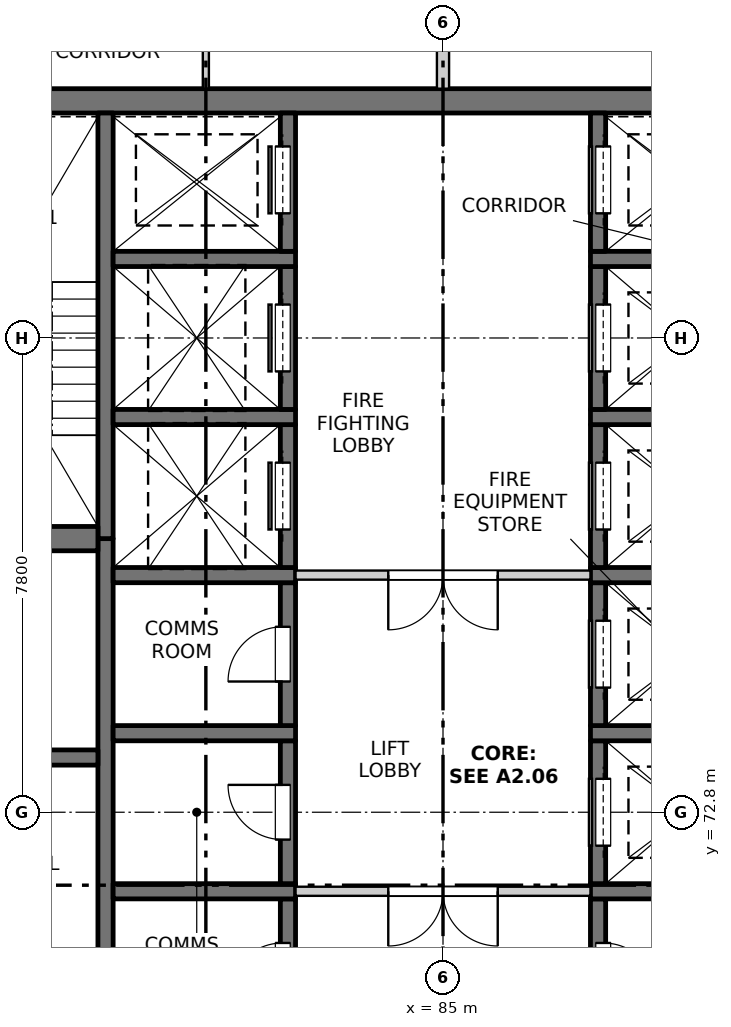
"""IFC4 building model, lengths in metres.
Left out: names, types, materials, properties, quantities, classifications, styles, units other than length and angle.
Written with IfcOpenShell. Run it as: python <this file> out.ifc"""

import sys

from ifc_helpers import new_model, si_unit, direction, frame, frame_2d, origin, place, context, subcontext, project, spatial, rectangle, extrude, element, fill, save


model = new_model("IFC4")
c1 = context("Model", 3, precision=1e-05, world=origin(), true_north=direction((0.0, 1.0)))
c2 = subcontext(c1, "Body", "Model", "MODEL_VIEW")
j1 = project(units=[si_unit("LENGTHUNIT", "METRE"), si_unit("PLANEANGLEUNIT", "RADIAN")], contexts=[c1])
p1 = place(None, origin())
s1 = spatial("IfcSite", under=j1, at=p1, CompositionType="ELEMENT")
p2 = place(p1, origin())
s2 = spatial("IfcBuilding", under=s1, at=p2, CompositionType="ELEMENT")
p3 = place(p2, frame((0.0, 0.0, 238.1)))
s3 = spatial("IfcBuildingStorey", under=s2, at=p3, CompositionType="ELEMENT", Elevation=238.1)
p4 = place(p3, frame((75.45, 84.5, -0.25), z_axis=(0.0, 0.0, 1.0), x_axis=(1.0, 0.0, 0.0)))
e1 = element("IfcWall", 1, at=p4, inside=s3, PredefinedType="SOLIDWALL", context=c2, shape_type="SweptSolid", body=[
    extrude(rectangle(XDim=19.1, YDim=0.4, at=frame_2d((9.55, 0.0))), origin(), (0.0, 0.0, 1.0), 3.35),
])
p5 = place(p3, frame((79.45, 60.975, -0.25), z_axis=(0.0, 0.0, 1.0), x_axis=(0.0, 1.0, 0.0)))
e2 = element("IfcWall", 2, at=p5, inside=s3, PredefinedType="SOLIDWALL", context=c2, shape_type="SweptSolid", body=[
    extrude(rectangle(XDim=16.325, YDim=0.25, at=frame_2d((8.163, 0.0))), origin(), (0.0, 0.0, 1.0), 3.35),
])
p6 = place(p3, frame((79.45, 77.3, -0.25), z_axis=(0.0, 0.0, 1.0), x_axis=(0.0, 1.0, 0.0)))
e3 = element("IfcWall", 3, at=p6, inside=s3, PredefinedType="SOLIDWALL", context=c2, shape_type="SweptSolid", body=[
    extrude(rectangle(XDim=7.0, YDim=0.25, at=frame_2d((3.5, 0.0))), origin(), (0.0, 0.0, 1.0), 3.35),
])
p7 = place(p3, frame((82.45, 69.025, -0.25), z_axis=(0.0, 0.0, 1.0), x_axis=(0.0, 1.0, 0.0)))
e4 = element("IfcWall", 4, at=p7, inside=s3, PredefinedType="SOLIDWALL", context=c2, shape_type="SweptSolid", body=[
    extrude(rectangle(XDim=2.35, YDim=0.25, at=frame_2d((1.175, 0.0))), origin(), (0.0, 0.0, 1.0), 3.35),
])
p8 = place(p7, frame((0.725, 0.0, 0.25)))
e5 = element("IfcOpeningElement", 5, at=p8, cuts=e4, PredefinedType="OPENING", context=c2, shape_type="SweptSolid", body=[
    extrude(rectangle(XDim=0.9, YDim=2.1, at=frame_2d((0.45, 1.05))), frame((0.0, 0.135, 0.0), z_axis=(0.0, -1.0, 0.0), x_axis=(1.0, 0.0, 0.0)), (0.0, 0.0, 1.0), 0.27),
])
p9 = place(p3, frame((79.575, 71.5, -0.25), z_axis=(0.0, 0.0, 1.0), x_axis=(1.0, 0.0, 0.0)))
e6 = element("IfcWall", 6, at=p9, inside=s3, PredefinedType="SOLIDWALL", context=c2, shape_type="SweptSolid", body=[
    extrude(rectangle(XDim=3.0, YDim=0.25, at=frame_2d((1.5, 0.0))), origin(), (0.0, 0.0, 1.0), 3.35),
])
p10 = place(p3, frame((82.45, 71.625, -0.25), z_axis=(0.0, 0.0, 1.0), x_axis=(0.0, 1.0, 0.0)))
e7 = element("IfcWall", 7, at=p10, inside=s3, PredefinedType="SOLIDWALL", context=c2, shape_type="SweptSolid", body=[
    extrude(rectangle(XDim=2.35, YDim=0.25, at=frame_2d((1.175, 0.0))), origin(), (0.0, 0.0, 1.0), 3.35),
])
p11 = place(p10, frame((0.725, 0.0, 0.25)))
e8 = element("IfcOpeningElement", 8, at=p11, cuts=e7, PredefinedType="OPENING", context=c2, shape_type="SweptSolid", body=[
    extrude(rectangle(XDim=0.9, YDim=2.1, at=frame_2d((0.45, 1.05))), frame((0.0, 0.135, 0.0), z_axis=(0.0, -1.0, 0.0), x_axis=(1.0, 0.0, 0.0)), (0.0, 0.0, 1.0), 0.27),
])
p12 = place(p3, frame((79.575, 74.1, -0.25), z_axis=(0.0, 0.0, 1.0), x_axis=(1.0, 0.0, 0.0)))
e9 = element("IfcWall", 9, at=p12, inside=s3, PredefinedType="SOLIDWALL", context=c2, shape_type="SweptSolid", body=[
    extrude(rectangle(XDim=3.0, YDim=0.25, at=frame_2d((1.5, 0.0))), origin(), (0.0, 0.0, 1.0), 3.35),
])
p13 = place(p3, frame((82.45, 74.225, -0.25), z_axis=(0.0, 0.0, 1.0), x_axis=(0.0, 1.0, 0.0)))
e10 = element("IfcWall", 10, at=p13, inside=s3, PredefinedType="SOLIDWALL", context=c2, shape_type="SweptSolid", body=[
    extrude(rectangle(XDim=2.35, YDim=0.25, at=frame_2d((1.175, 0.0))), origin(), (0.0, 0.0, 1.0), 3.35),
])
p14 = place(p13, frame((0.725, 0.0, 0.25)))
e11 = element("IfcOpeningElement", 11, at=p14, cuts=e10, PredefinedType="OPENING", context=c2, shape_type="SweptSolid", body=[
    extrude(rectangle(XDim=0.9, YDim=2.1, at=frame_2d((0.45, 1.05))), frame((0.0, 0.135, 0.0), z_axis=(0.0, -1.0, 0.0), x_axis=(1.0, 0.0, 0.0)), (0.0, 0.0, 1.0), 0.27),
])
p15 = place(p3, frame((79.575, 76.7, -0.25), z_axis=(0.0, 0.0, 1.0), x_axis=(1.0, 0.0, 0.0)))
e12 = element("IfcWall", 12, at=p15, inside=s3, PredefinedType="SOLIDWALL", context=c2, shape_type="SweptSolid", body=[
    extrude(rectangle(XDim=3.0, YDim=0.25, at=frame_2d((1.5, 0.0))), origin(), (0.0, 0.0, 1.0), 3.35),
])
p16 = place(p3, frame((82.45, 76.825, -0.25), z_axis=(0.0, 0.0, 1.0), x_axis=(0.0, 1.0, 0.0)))
e13 = element("IfcWall", 13, at=p16, inside=s3, PredefinedType="SOLIDWALL", context=c2, shape_type="SweptSolid", body=[
    extrude(rectangle(XDim=2.35, YDim=0.25, at=frame_2d((1.175, 0.0))), origin(), (0.0, 0.0, 1.0), 3.35),
])
p17 = place(p16, frame((0.625, 0.0, 0.25)))
e14 = element("IfcOpeningElement", 14, at=p17, cuts=e13, PredefinedType="OPENING", context=c2, shape_type="SweptSolid", body=[
    extrude(rectangle(XDim=1.1, YDim=2.1, at=frame_2d((0.55, 1.05))), frame((0.0, 0.135, 0.0), z_axis=(0.0, -1.0, 0.0), x_axis=(1.0, 0.0, 0.0)), (0.0, 0.0, 1.0), 0.27),
])
p18 = place(p3, frame((79.575, 79.3, -0.25), z_axis=(0.0, 0.0, 1.0), x_axis=(1.0, 0.0, 0.0)))
e15 = element("IfcWall", 15, at=p18, inside=s3, PredefinedType="SOLIDWALL", context=c2, shape_type="SweptSolid", body=[
    extrude(rectangle(XDim=3.0, YDim=0.25, at=frame_2d((1.5, 0.0))), origin(), (0.0, 0.0, 1.0), 3.35),
])
p19 = place(p3, frame((82.45, 79.425, -0.25), z_axis=(0.0, 0.0, 1.0), x_axis=(0.0, 1.0, 0.0)))
e16 = element("IfcWall", 16, at=p19, inside=s3, PredefinedType="SOLIDWALL", context=c2, shape_type="SweptSolid", body=[
    extrude(rectangle(XDim=2.35, YDim=0.25, at=frame_2d((1.175, 0.0))), origin(), (0.0, 0.0, 1.0), 3.35),
])
p20 = place(p19, frame((0.625, 0.0, 0.25)))
e17 = element("IfcOpeningElement", 17, at=p20, cuts=e16, PredefinedType="OPENING", context=c2, shape_type="SweptSolid", body=[
    extrude(rectangle(XDim=1.1, YDim=2.1, at=frame_2d((0.55, 1.05))), frame((0.0, 0.135, 0.0), z_axis=(0.0, -1.0, 0.0), x_axis=(1.0, 0.0, 0.0)), (0.0, 0.0, 1.0), 0.27),
])
p21 = place(p3, frame((79.575, 81.9, -0.25), z_axis=(0.0, 0.0, 1.0), x_axis=(1.0, 0.0, 0.0)))
e18 = element("IfcWall", 18, at=p21, inside=s3, PredefinedType="SOLIDWALL", context=c2, shape_type="SweptSolid", body=[
    extrude(rectangle(XDim=3.0, YDim=0.25, at=frame_2d((1.5, 0.0))), origin(), (0.0, 0.0, 1.0), 3.35),
])
p22 = place(p3, frame((82.45, 82.025, -0.25), z_axis=(0.0, 0.0, 1.0), x_axis=(0.0, 1.0, 0.0)))
e19 = element("IfcWall", 19, at=p22, inside=s3, PredefinedType="SOLIDWALL", context=c2, shape_type="SweptSolid", body=[
    extrude(rectangle(XDim=2.275, YDim=0.25, at=frame_2d((1.138, 0.0))), origin(), (0.0, 0.0, 1.0), 3.35),
])
p23 = place(p22, frame((0.625, 0.0, 0.25)))
e20 = element("IfcOpeningElement", 20, at=p23, cuts=e19, PredefinedType="OPENING", context=c2, shape_type="SweptSolid", body=[
    extrude(rectangle(XDim=1.1, YDim=2.1, at=frame_2d((0.55, 1.05))), frame((0.0, 0.135, 0.0), z_axis=(0.0, -1.0, 0.0), x_axis=(1.0, 0.0, 0.0)), (0.0, 0.0, 1.0), 0.27),
])
p24 = place(p3, frame((87.55, 69.025, -0.25), z_axis=(0.0, 0.0, 1.0), x_axis=(0.0, 1.0, 0.0)))
e21 = element("IfcWall", 21, at=p24, inside=s3, PredefinedType="SOLIDWALL", context=c2, shape_type="SweptSolid", body=[
    extrude(rectangle(XDim=2.35, YDim=0.25, at=frame_2d((1.175, 0.0))), origin(), (0.0, 0.0, 1.0), 3.35),
])
p25 = place(p24, frame((0.725, 0.0, 0.25)))
e22 = element("IfcOpeningElement", 22, at=p25, cuts=e21, PredefinedType="OPENING", context=c2, shape_type="SweptSolid", body=[
    extrude(rectangle(XDim=0.9, YDim=2.1, at=frame_2d((0.45, 1.05))), frame((0.0, 0.135, 0.0), z_axis=(0.0, -1.0, 0.0), x_axis=(1.0, 0.0, 0.0)), (0.0, 0.0, 1.0), 0.27),
])
p26 = place(p3, frame((87.425, 71.5, -0.25), z_axis=(0.0, 0.0, 1.0), x_axis=(1.0, 0.0, 0.0)))
e23 = element("IfcWall", 23, at=p26, inside=s3, PredefinedType="SOLIDWALL", context=c2, shape_type="SweptSolid", body=[
    extrude(rectangle(XDim=3.0, YDim=0.25, at=frame_2d((1.5, 0.0))), origin(), (0.0, 0.0, 1.0), 3.35),
])
p27 = place(p3, frame((87.55, 71.625, -0.25), z_axis=(0.0, 0.0, 1.0), x_axis=(0.0, 1.0, 0.0)))
e24 = element("IfcWall", 24, at=p27, inside=s3, PredefinedType="SOLIDWALL", context=c2, shape_type="SweptSolid", body=[
    extrude(rectangle(XDim=2.35, YDim=0.25, at=frame_2d((1.175, 0.0))), origin(), (0.0, 0.0, 1.0), 3.35),
])
p28 = place(p27, frame((0.625, 0.0, 0.25)))
e25 = element("IfcOpeningElement", 25, at=p28, cuts=e24, PredefinedType="OPENING", context=c2, shape_type="SweptSolid", body=[
    extrude(rectangle(XDim=1.1, YDim=2.1, at=frame_2d((0.55, 1.05))), frame((0.0, 0.135, 0.0), z_axis=(0.0, -1.0, 0.0), x_axis=(1.0, 0.0, 0.0)), (0.0, 0.0, 1.0), 0.27),
])
p29 = place(p3, frame((87.425, 74.1, -0.25), z_axis=(0.0, 0.0, 1.0), x_axis=(1.0, 0.0, 0.0)))
e26 = element("IfcWall", 26, at=p29, inside=s3, PredefinedType="SOLIDWALL", context=c2, shape_type="SweptSolid", body=[
    extrude(rectangle(XDim=3.0, YDim=0.25, at=frame_2d((1.5, 0.0))), origin(), (0.0, 0.0, 1.0), 3.35),
])
p30 = place(p3, frame((87.55, 74.225, -0.25), z_axis=(0.0, 0.0, 1.0), x_axis=(0.0, 1.0, 0.0)))
e27 = element("IfcWall", 27, at=p30, inside=s3, PredefinedType="SOLIDWALL", context=c2, shape_type="SweptSolid", body=[
    extrude(rectangle(XDim=2.35, YDim=0.25, at=frame_2d((1.175, 0.0))), origin(), (0.0, 0.0, 1.0), 3.35),
])
p31 = place(p30, frame((0.625, 0.0, 0.25)))
e28 = element("IfcOpeningElement", 28, at=p31, cuts=e27, PredefinedType="OPENING", context=c2, shape_type="SweptSolid", body=[
    extrude(rectangle(XDim=1.1, YDim=2.1, at=frame_2d((0.55, 1.05))), frame((0.0, 0.135, 0.0), z_axis=(0.0, -1.0, 0.0), x_axis=(1.0, 0.0, 0.0)), (0.0, 0.0, 1.0), 0.27),
])
p32 = place(p3, frame((87.425, 76.7, -0.25), z_axis=(0.0, 0.0, 1.0), x_axis=(1.0, 0.0, 0.0)))
e29 = element("IfcWall", 29, at=p32, inside=s3, PredefinedType="SOLIDWALL", context=c2, shape_type="SweptSolid", body=[
    extrude(rectangle(XDim=3.0, YDim=0.25, at=frame_2d((1.5, 0.0))), origin(), (0.0, 0.0, 1.0), 3.35),
])
p33 = place(p3, frame((87.55, 76.825, -0.25), z_axis=(0.0, 0.0, 1.0), x_axis=(0.0, 1.0, 0.0)))
e30 = element("IfcWall", 30, at=p33, inside=s3, PredefinedType="SOLIDWALL", context=c2, shape_type="SweptSolid", body=[
    extrude(rectangle(XDim=2.35, YDim=0.25, at=frame_2d((1.175, 0.0))), origin(), (0.0, 0.0, 1.0), 3.35),
])
p34 = place(p33, frame((0.625, 0.0, 0.25)))
e31 = element("IfcOpeningElement", 31, at=p34, cuts=e30, PredefinedType="OPENING", context=c2, shape_type="SweptSolid", body=[
    extrude(rectangle(XDim=1.1, YDim=2.1, at=frame_2d((0.55, 1.05))), frame((0.0, 0.135, 0.0), z_axis=(0.0, -1.0, 0.0), x_axis=(1.0, 0.0, 0.0)), (0.0, 0.0, 1.0), 0.27),
])
p35 = place(p3, frame((87.425, 79.3, -0.25), z_axis=(0.0, 0.0, 1.0), x_axis=(1.0, 0.0, 0.0)))
e32 = element("IfcWall", 32, at=p35, inside=s3, PredefinedType="SOLIDWALL", context=c2, shape_type="SweptSolid", body=[
    extrude(rectangle(XDim=3.0, YDim=0.25, at=frame_2d((1.5, 0.0))), origin(), (0.0, 0.0, 1.0), 3.35),
])
p36 = place(p3, frame((87.55, 79.425, -0.25), z_axis=(0.0, 0.0, 1.0), x_axis=(0.0, 1.0, 0.0)))
e33 = element("IfcWall", 33, at=p36, inside=s3, PredefinedType="SOLIDWALL", context=c2, shape_type="SweptSolid", body=[
    extrude(rectangle(XDim=2.35, YDim=0.25, at=frame_2d((1.175, 0.0))), origin(), (0.0, 0.0, 1.0), 3.35),
])
p37 = place(p36, frame((0.625, 0.0, 0.25)))
e34 = element("IfcOpeningElement", 34, at=p37, cuts=e33, PredefinedType="OPENING", context=c2, shape_type="SweptSolid", body=[
    extrude(rectangle(XDim=1.1, YDim=2.1, at=frame_2d((0.55, 1.05))), frame((0.0, 0.135, 0.0), z_axis=(0.0, -1.0, 0.0), x_axis=(1.0, 0.0, 0.0)), (0.0, 0.0, 1.0), 0.27),
])
p38 = place(p3, frame((87.425, 81.9, -0.25), z_axis=(0.0, 0.0, 1.0), x_axis=(1.0, 0.0, 0.0)))
e35 = element("IfcWall", 35, at=p38, inside=s3, PredefinedType="SOLIDWALL", context=c2, shape_type="SweptSolid", body=[
    extrude(rectangle(XDim=3.0, YDim=0.25, at=frame_2d((1.5, 0.0))), origin(), (0.0, 0.0, 1.0), 3.35),
])
p39 = place(p3, frame((87.55, 82.025, -0.25), z_axis=(0.0, 0.0, 1.0), x_axis=(0.0, 1.0, 0.0)))
e36 = element("IfcWall", 36, at=p39, inside=s3, PredefinedType="SOLIDWALL", context=c2, shape_type="SweptSolid", body=[
    extrude(rectangle(XDim=2.275, YDim=0.25, at=frame_2d((1.138, 0.0))), origin(), (0.0, 0.0, 1.0), 3.35),
])
p40 = place(p39, frame((0.625, 0.0, 0.25)))
e37 = element("IfcOpeningElement", 37, at=p40, cuts=e36, PredefinedType="OPENING", context=c2, shape_type="SweptSolid", body=[
    extrude(rectangle(XDim=1.1, YDim=2.1, at=frame_2d((0.55, 1.05))), frame((0.0, 0.135, 0.0), z_axis=(0.0, -1.0, 0.0), x_axis=(1.0, 0.0, 0.0)), (0.0, 0.0, 1.0), 0.27),
])
p41 = place(p3, frame((75.45, 73.7, -0.25), z_axis=(0.0, 0.0, 1.0), x_axis=(1.0, 0.0, 0.0)))
e38 = element("IfcWall", 38, at=p41, inside=s3, PredefinedType="SOLIDWALL", context=c2, shape_type="SweptSolid", body=[
    extrude(rectangle(XDim=3.875, YDim=0.25, at=frame_2d((1.938, 0.0))), origin(), (0.0, 0.0, 1.0), 3.35),
])
p42 = place(p3, frame((75.45, 77.3, -0.25), z_axis=(0.0, 0.0, 1.0), x_axis=(1.0, 0.0, 0.0)))
e39 = element("IfcWall", 39, at=p42, inside=s3, PredefinedType="SOLIDWALL", context=c2, shape_type="SweptSolid", body=[
    extrude(rectangle(XDim=3.875, YDim=0.4, at=frame_2d((1.938, 0.0))), origin(), (0.0, 0.0, 1.0), 3.35),
])
p43 = place(p3, frame((82.575, 71.5, 0.0), z_axis=(0.0, 0.0, 1.0), x_axis=(1.0, 0.0, 0.0)))
e40 = element("IfcWall", 40, at=p43, inside=s3, PredefinedType="PARTITIONING", context=c2, shape_type="SweptSolid", body=[
    extrude(rectangle(XDim=4.85, YDim=0.15, at=frame_2d((2.425, 0.0))), origin(), (0.0, 0.0, 1.0), 3.1),
])
p44 = place(p43, frame((1.525, 0.0, 0.0)))
e41 = element("IfcOpeningElement", 41, at=p44, cuts=e40, PredefinedType="OPENING", context=c2, shape_type="SweptSolid", body=[
    extrude(rectangle(XDim=1.8, YDim=2.1, at=frame_2d((0.9, 1.05))), frame((0.0, 0.085, 0.0), z_axis=(0.0, -1.0, 0.0), x_axis=(1.0, 0.0, 0.0)), (0.0, 0.0, 1.0), 0.17),
])
p45 = place(p3, frame((82.575, 76.7, 0.0), z_axis=(0.0, 0.0, 1.0), x_axis=(1.0, 0.0, 0.0)))
e42 = element("IfcWall", 42, at=p45, inside=s3, PredefinedType="PARTITIONING", context=c2, shape_type="SweptSolid", body=[
    extrude(rectangle(XDim=4.85, YDim=0.15, at=frame_2d((2.425, 0.0))), origin(), (0.0, 0.0, 1.0), 3.1),
])
p46 = place(p45, frame((1.525, 0.0, 0.0)))
e43 = element("IfcOpeningElement", 43, at=p46, cuts=e42, PredefinedType="OPENING", context=c2, shape_type="SweptSolid", body=[
    extrude(rectangle(XDim=1.8, YDim=2.1, at=frame_2d((0.9, 1.05))), frame((0.0, 0.085, 0.0), z_axis=(0.0, -1.0, 0.0), x_axis=(1.0, 0.0, 0.0)), (0.0, 0.0, 1.0), 0.17),
])
p47 = place(p3, frame((81.1, 84.7, 0.0), z_axis=(0.0, 0.0, 1.0), x_axis=(0.0, 1.0, 0.0)))
e44 = element("IfcWall", 44, at=p47, inside=s3, PredefinedType="PARTITIONING", context=c2, shape_type="SweptSolid", body=[
    extrude(rectangle(XDim=3.4, YDim=0.1, at=frame_2d((1.7, 0.0))), origin(), (0.0, 0.0, 1.0), 3.1),
])
p48 = place(p47, frame((1.3, 0.0, 0.0)))
e45 = element("IfcOpeningElement", 45, at=p48, cuts=e44, PredefinedType="OPENING", context=c2, shape_type="SweptSolid", body=[
    extrude(rectangle(XDim=0.9, YDim=2.1, at=frame_2d((0.45, 1.05))), frame((0.0, 0.06, 0.0), z_axis=(0.0, -1.0, 0.0), x_axis=(1.0, 0.0, 0.0)), (0.0, 0.0, 1.0), 0.12),
])
p49 = place(p3, frame((85.0, 84.7, 0.0), z_axis=(0.0, 0.0, 1.0), x_axis=(0.0, 1.0, 0.0)))
e46 = element("IfcWall", 46, at=p49, inside=s3, PredefinedType="PARTITIONING", context=c2, shape_type="SweptSolid", body=[
    extrude(rectangle(XDim=3.4, YDim=0.2, at=frame_2d((1.7, 0.0))), origin(), (0.0, 0.0, 1.0), 3.1),
])
p50 = place(p8, origin())
e47 = element("IfcDoor", 47, at=p50, inside=s3, OperationType="SINGLE_SWING_LEFT", PredefinedType="DOOR", context=c2, shape_type="SweptSolid", body=[
    extrude(rectangle(XDim=0.9, YDim=2.1, at=frame_2d((0.45, 1.05))), frame((0.0, 0.11, 0.0), z_axis=(0.0, -1.0, 0.0), x_axis=(1.0, 0.0, 0.0)), (0.0, 0.0, 1.0), 0.05),
])
fill(e5, e47)
p51 = place(p25, origin())
e48 = element("IfcDoor", 48, at=p51, inside=s3, OperationType="SINGLE_SWING_RIGHT", PredefinedType="DOOR", context=c2, shape_type="SweptSolid", body=[
    extrude(rectangle(XDim=0.9, YDim=2.1, at=frame_2d((0.45, 1.05))), frame((0.0, -0.06, 0.0), z_axis=(0.0, -1.0, 0.0), x_axis=(1.0, 0.0, 0.0)), (0.0, 0.0, 1.0), 0.05),
])
fill(e22, e48)
p52 = place(p44, origin())
e49 = element("IfcDoor", 49, at=p52, inside=s3, OperationType="DOUBLE_DOOR_SINGLE_SWING", PredefinedType="DOOR", context=c2, shape_type="SweptSolid", body=[
    extrude(rectangle(XDim=1.8, YDim=2.1, at=frame_2d((0.9, 1.05))), frame((0.0, 0.025, 0.0), z_axis=(0.0, -1.0, 0.0), x_axis=(1.0, 0.0, 0.0)), (0.0, 0.0, 1.0), 0.05),
])
fill(e41, e49)
p53 = place(p11, origin())
e50 = element("IfcDoor", 50, at=p53, inside=s3, OperationType="SINGLE_SWING_RIGHT", PredefinedType="DOOR", context=c2, shape_type="SweptSolid", body=[
    extrude(rectangle(XDim=0.9, YDim=2.1, at=frame_2d((0.45, 1.05))), frame((0.0, 0.11, 0.0), z_axis=(0.0, -1.0, 0.0), x_axis=(1.0, 0.0, 0.0)), (0.0, 0.0, 1.0), 0.05),
])
fill(e8, e50)
p54 = place(p28, origin())
e51 = element("IfcDoor", 51, at=p54, inside=s3, OperationType="SLIDING_TO_LEFT", PredefinedType="DOOR", context=c2, shape_type="SweptSolid", body=[
    extrude(rectangle(XDim=1.1, YDim=2.1, at=frame_2d((0.55, 1.05))), frame((0.0, -0.06, 0.0), z_axis=(0.0, -1.0, 0.0), x_axis=(1.0, 0.0, 0.0)), (0.0, 0.0, 1.0), 0.05),
])
fill(e25, e51)
p55 = place(p14, origin())
e52 = element("IfcDoor", 52, at=p55, inside=s3, OperationType="SINGLE_SWING_LEFT", PredefinedType="DOOR", context=c2, shape_type="SweptSolid", body=[
    extrude(rectangle(XDim=0.9, YDim=2.1, at=frame_2d((0.45, 1.05))), frame((0.0, 0.11, 0.0), z_axis=(0.0, -1.0, 0.0), x_axis=(1.0, 0.0, 0.0)), (0.0, 0.0, 1.0), 0.05),
])
fill(e11, e52)
p56 = place(p31, origin())
e53 = element("IfcDoor", 53, at=p56, inside=s3, OperationType="SLIDING_TO_LEFT", PredefinedType="DOOR", context=c2, shape_type="SweptSolid", body=[
    extrude(rectangle(XDim=1.1, YDim=2.1, at=frame_2d((0.55, 1.05))), frame((0.0, -0.06, 0.0), z_axis=(0.0, -1.0, 0.0), x_axis=(1.0, 0.0, 0.0)), (0.0, 0.0, 1.0), 0.05),
])
fill(e28, e53)
p57 = place(p46, origin())
e54 = element("IfcDoor", 54, at=p57, inside=s3, OperationType="DOUBLE_DOOR_SINGLE_SWING", PredefinedType="DOOR", context=c2, shape_type="SweptSolid", body=[
    extrude(rectangle(XDim=1.8, YDim=2.1, at=frame_2d((0.9, 1.05))), frame((0.0, 0.025, 0.0), z_axis=(0.0, -1.0, 0.0), x_axis=(1.0, 0.0, 0.0)), (0.0, 0.0, 1.0), 0.05),
])
fill(e43, e54)
p58 = place(p17, origin())
e55 = element("IfcDoor", 55, at=p58, inside=s3, OperationType="SLIDING_TO_LEFT", PredefinedType="DOOR", context=c2, shape_type="SweptSolid", body=[
    extrude(rectangle(XDim=1.1, YDim=2.1, at=frame_2d((0.55, 1.05))), frame((0.0, 0.11, 0.0), z_axis=(0.0, -1.0, 0.0), x_axis=(1.0, 0.0, 0.0)), (0.0, 0.0, 1.0), 0.05),
])
fill(e14, e55)
p59 = place(p34, origin())
e56 = element("IfcDoor", 56, at=p59, inside=s3, OperationType="SLIDING_TO_LEFT", PredefinedType="DOOR", context=c2, shape_type="SweptSolid", body=[
    extrude(rectangle(XDim=1.1, YDim=2.1, at=frame_2d((0.55, 1.05))), frame((0.0, -0.06, 0.0), z_axis=(0.0, -1.0, 0.0), x_axis=(1.0, 0.0, 0.0)), (0.0, 0.0, 1.0), 0.05),
])
fill(e31, e56)
p60 = place(p20, origin())
e57 = element("IfcDoor", 57, at=p60, inside=s3, OperationType="SLIDING_TO_LEFT", PredefinedType="DOOR", context=c2, shape_type="SweptSolid", body=[
    extrude(rectangle(XDim=1.1, YDim=2.1, at=frame_2d((0.55, 1.05))), frame((0.0, 0.11, 0.0), z_axis=(0.0, -1.0, 0.0), x_axis=(1.0, 0.0, 0.0)), (0.0, 0.0, 1.0), 0.05),
])
fill(e17, e57)
p61 = place(p37, origin())
e58 = element("IfcDoor", 58, at=p61, inside=s3, OperationType="SLIDING_TO_RIGHT", PredefinedType="DOOR", context=c2, shape_type="SweptSolid", body=[
    extrude(rectangle(XDim=1.1, YDim=2.1, at=frame_2d((0.55, 1.05))), frame((0.0, -0.06, 0.0), z_axis=(0.0, -1.0, 0.0), x_axis=(1.0, 0.0, 0.0)), (0.0, 0.0, 1.0), 0.05),
])
fill(e34, e58)
p62 = place(p23, origin())
e59 = element("IfcDoor", 59, at=p62, inside=s3, OperationType="SLIDING_TO_RIGHT", PredefinedType="DOOR", context=c2, shape_type="SweptSolid", body=[
    extrude(rectangle(XDim=1.1, YDim=2.1, at=frame_2d((0.55, 1.05))), frame((0.0, 0.11, 0.0), z_axis=(0.0, -1.0, 0.0), x_axis=(1.0, 0.0, 0.0)), (0.0, 0.0, 1.0), 0.05),
])
fill(e20, e59)
p63 = place(p40, origin())
e60 = element("IfcDoor", 60, at=p63, inside=s3, OperationType="SLIDING_TO_RIGHT", PredefinedType="DOOR", context=c2, shape_type="SweptSolid", body=[
    extrude(rectangle(XDim=1.1, YDim=2.1, at=frame_2d((0.55, 1.05))), frame((0.0, -0.06, 0.0), z_axis=(0.0, -1.0, 0.0), x_axis=(1.0, 0.0, 0.0)), (0.0, 0.0, 1.0), 0.05),
])
fill(e37, e60)
save(model, sys.argv[1])
